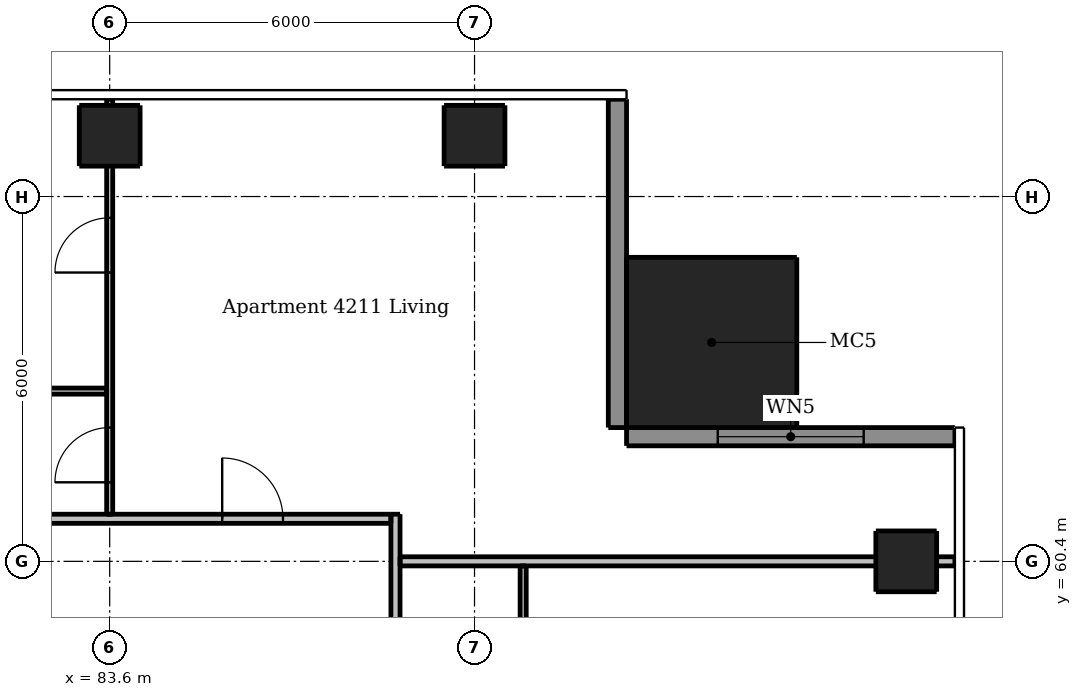
"""IFC4 building model, lengths in metres.
Left out: names, types, materials, properties, quantities, classifications, styles, units other than length and angle.
Written with IfcOpenShell. Run it as: python <this file> out.ifc"""

import sys

from ifc_helpers import new_model, si_unit, direction, frame, frame_2d, origin, origin_2d, place, context, subcontext, project, spatial, rectangle, extrude, element, fill, save


model = new_model("IFC4")
c1 = context("Model", 3, precision=1e-05, world=origin(), true_north=direction((0.0, 1.0)))
c2 = subcontext(c1, "Body", "Model", "MODEL_VIEW")
j1 = project(units=[si_unit("LENGTHUNIT", "METRE"), si_unit("PLANEANGLEUNIT", "RADIAN")], contexts=[c1])
p1 = place(None, origin())
s1 = spatial("IfcSite", under=j1, at=p1, CompositionType="ELEMENT")
p2 = place(p1, origin())
s2 = spatial("IfcBuilding", under=s1, at=p2, CompositionType="ELEMENT")
p3 = place(p2, frame((0.0, 0.0, 158.2)))
s3 = spatial("IfcBuildingStorey", under=s2, at=p3, CompositionType="ELEMENT", Elevation=158.2)
for number, where, z_axis, x_axis in (
    (1, (96.7, 60.4, 0.0), (0.0, 0.0, 1.0), (1.0, 0.0, 0.0)),
    (2, (83.6, 67.4, 0.0), (0.0, 0.0, 1.0), (1.0, 0.0, 0.0)),
    (3, (89.6, 67.4, 0.0), (0.0, 0.0, 1.0), (1.0, 0.0, 0.0)),
):
    element("IfcColumn", number, at=place(p3, frame(where, z_axis=z_axis, x_axis=x_axis)), inside=s3, PredefinedType="COLUMN", context=c2, shape_type="SweptSolid", body=[
        extrude(rectangle(XDim=1.0, YDim=1.0, at=origin_2d()), origin(), (0.0, 0.0, 1.0), 3.05),
    ])
p4 = place(p3, frame((93.5, 64.0, 0.0), z_axis=(0.0, 0.0, 1.0), x_axis=(1.0, 0.0, 0.0)))
e4 = element("IfcColumn", 4, at=p4, inside=s3, PredefinedType="COLUMN", context=c2, shape_type="SweptSolid", body=[
    extrude(rectangle(XDim=2.8, YDim=2.8, at=origin_2d()), origin(), (0.0, 0.0, 1.0), 3.3),
])
p5 = place(p3, frame((97.5, 62.45, 0.0), z_axis=(0.0, 0.0, 1.0), x_axis=(-1.0, 0.0, 0.0)))
e5 = element("IfcWall", 5, at=p5, inside=s3, PredefinedType="SOLIDWALL", context=c2, shape_type="SweptSolid", body=[
    extrude(rectangle(XDim=5.4, YDim=0.3, at=frame_2d((2.7, 0.0))), origin(), (0.0, 0.0, 1.0), 3.05),
])
p6 = place(p5, frame((1.5, 0.0, 0.15)))
e6 = element("IfcOpeningElement", 6, at=p6, cuts=e5, PredefinedType="OPENING", context=c2, shape_type="SweptSolid", body=[
    extrude(rectangle(XDim=2.4, YDim=2.1, at=frame_2d((1.2, 1.05))), frame((0.0, 0.16, 0.0), z_axis=(0.0, -1.0, 0.0), x_axis=(1.0, 0.0, 0.0)), (0.0, 0.0, 1.0), 0.32),
])
p7 = place(p3, frame((91.95, 62.6, 0.0), z_axis=(0.0, 0.0, 1.0), x_axis=(0.0, 1.0, 0.0)))
e7 = element("IfcWall", 7, at=p7, inside=s3, PredefinedType="SOLIDWALL", context=c2, shape_type="SweptSolid", body=[
    extrude(rectangle(XDim=5.4, YDim=0.3, at=frame_2d((2.7, 0.0))), origin(), (0.0, 0.0, 1.0), 3.05),
])
p8 = place(p3, frame((83.6, 61.175, 0.0), z_axis=(0.0, 0.0, 1.0), x_axis=(0.0, 1.0, 0.0)))
e8 = element("IfcWall", 8, at=p8, inside=s3, PredefinedType="PARTITIONING", context=c2, shape_type="SweptSolid", body=[
    extrude(rectangle(XDim=6.825, YDim=0.1, at=frame_2d((3.413, 0.0))), origin(), (0.0, 0.0, 1.0), 2.516),
])
p9 = place(p8, frame((0.525, 0.0, 0.0)))
e9 = element("IfcOpeningElement", 9, at=p9, cuts=e8, PredefinedType="OPENING", context=c2, shape_type="SweptSolid", body=[
    extrude(rectangle(XDim=0.9, YDim=2.1, at=frame_2d((0.45, 1.05))), frame((0.0, 0.06, 0.0), z_axis=(0.0, -1.0, 0.0), x_axis=(1.0, 0.0, 0.0)), (0.0, 0.0, 1.0), 0.12),
])
p10 = place(p8, frame((3.975, 0.0, 0.0)))
e10 = element("IfcOpeningElement", 10, at=p10, cuts=e8, PredefinedType="OPENING", context=c2, shape_type="SweptSolid", body=[
    extrude(rectangle(XDim=0.9, YDim=2.1, at=frame_2d((0.45, 1.05))), frame((0.0, 0.06, 0.0), z_axis=(0.0, -1.0, 0.0), x_axis=(1.0, 0.0, 0.0)), (0.0, 0.0, 1.0), 0.12),
])
p11 = place(p3, frame((90.4, 58.25, 0.0), z_axis=(0.0, 0.0, 1.0), x_axis=(0.0, 1.0, 0.0)))
e11 = element("IfcWall", 11, at=p11, inside=s3, PredefinedType="PARTITIONING", context=c2, shape_type="SweptSolid", body=[
    extrude(rectangle(XDim=2.075, YDim=0.1, at=frame_2d((1.038, 0.0))), origin(), (0.0, 0.0, 1.0), 3.05),
])
p12 = place(p3, frame((83.55, 63.2, 0.0), z_axis=(0.0, 0.0, 1.0), x_axis=(-1.0, 0.0, 0.0)))
e12 = element("IfcWall", 12, at=p12, inside=s3, PredefinedType="PARTITIONING", context=c2, shape_type="SweptSolid", body=[
    extrude(rectangle(XDim=5.875, YDim=0.1, at=frame_2d((2.938, 0.0))), origin(), (0.0, 0.0, 1.0), 3.05),
])
p13 = place(p12, frame((3.75, 0.0, 0.0)))
e13 = element("IfcOpeningElement", 13, at=p13, cuts=e12, PredefinedType="OPENING", context=c2, shape_type="SweptSolid", body=[
    extrude(rectangle(XDim=0.8, YDim=2.1, at=frame_2d((0.4, 1.05))), frame((0.0, 0.06, 0.0), z_axis=(0.0, -1.0, 0.0), x_axis=(1.0, 0.0, 0.0)), (0.0, 0.0, 1.0), 0.12),
])
p14 = place(p3, frame((88.3, 61.175, 0.0), z_axis=(0.0, 0.0, 1.0), x_axis=(0.0, -1.0, 0.0)))
e14 = element("IfcWall", 14, at=p14, inside=s3, PredefinedType="PARTITIONING", context=c2, shape_type="SweptSolid", body=[
    extrude(rectangle(XDim=29.4, YDim=0.15, at=frame_2d((14.7, 0.0))), origin(), (0.0, 0.0, 1.0), 3.05),
])
p15 = place(p14, frame((28.125, 0.0, 0.0)))
e15 = element("IfcOpeningElement", 15, at=p15, cuts=e14, PredefinedType="OPENING", context=c2, shape_type="SweptSolid", body=[
    extrude(rectangle(XDim=1.0, YDim=2.1, at=frame_2d((0.5, 1.05))), frame((0.0, 0.085, 0.0), z_axis=(0.0, -1.0, 0.0), x_axis=(1.0, 0.0, 0.0)), (0.0, 0.0, 1.0), 0.17),
])
p16 = place(p14, frame((18.275, 0.0, 0.0)))
e16 = element("IfcOpeningElement", 16, at=p16, cuts=e14, PredefinedType="OPENING", context=c2, shape_type="SweptSolid", body=[
    extrude(rectangle(XDim=1.0, YDim=2.1, at=frame_2d((0.5, 1.05))), frame((0.0, 0.085, 0.0), z_axis=(0.0, -1.0, 0.0), x_axis=(1.0, 0.0, 0.0)), (0.0, 0.0, 1.0), 0.17),
])
p17 = place(p14, frame((10.475, 0.0, 0.0)))
e17 = element("IfcOpeningElement", 17, at=p17, cuts=e14, PredefinedType="OPENING", context=c2, shape_type="SweptSolid", body=[
    extrude(rectangle(XDim=1.0, YDim=2.1, at=frame_2d((0.5, 1.05))), frame((0.0, 0.085, 0.0), z_axis=(0.0, -1.0, 0.0), x_axis=(1.0, 0.0, 0.0)), (0.0, 0.0, 1.0), 0.17),
])
p18 = place(p14, frame((3.275, 0.0, 0.0)))
e18 = element("IfcOpeningElement", 18, at=p18, cuts=e14, PredefinedType="OPENING", context=c2, shape_type="SweptSolid", body=[
    extrude(rectangle(XDim=1.0, YDim=2.1, at=frame_2d((0.5, 1.05))), frame((0.0, 0.085, 0.0), z_axis=(0.0, -1.0, 0.0), x_axis=(1.0, 0.0, 0.0)), (0.0, 0.0, 1.0), 0.17),
])
p19 = place(p3, frame((58.975, 61.1, 0.0), z_axis=(0.0, 0.0, 1.0), x_axis=(1.0, 0.0, 0.0)))
e19 = element("IfcWall", 19, at=p19, inside=s3, PredefinedType="PARTITIONING", context=c2, shape_type="SweptSolid", body=[
    extrude(rectangle(XDim=29.25, YDim=0.15, at=frame_2d((14.625, 0.0))), origin(), (0.0, 0.0, 1.0), 3.05),
])
p20 = place(p19, frame((3.125, 0.0, 0.0)))
e20 = element("IfcOpeningElement", 20, at=p20, cuts=e19, PredefinedType="OPENING", context=c2, shape_type="SweptSolid", body=[
    extrude(rectangle(XDim=1.0, YDim=2.1, at=frame_2d((0.5, 1.05))), frame((0.0, 0.085, 0.0), z_axis=(0.0, -1.0, 0.0), x_axis=(1.0, 0.0, 0.0)), (0.0, 0.0, 1.0), 0.17),
])
p21 = place(p19, frame((9.125, 0.0, 0.0)))
e21 = element("IfcOpeningElement", 21, at=p21, cuts=e19, PredefinedType="OPENING", context=c2, shape_type="SweptSolid", body=[
    extrude(rectangle(XDim=1.0, YDim=2.1, at=frame_2d((0.5, 1.05))), frame((0.0, 0.085, 0.0), z_axis=(0.0, -1.0, 0.0), x_axis=(1.0, 0.0, 0.0)), (0.0, 0.0, 1.0), 0.17),
])
p22 = place(p19, frame((15.125, 0.0, 0.0)))
e22 = element("IfcOpeningElement", 22, at=p22, cuts=e19, PredefinedType="OPENING", context=c2, shape_type="SweptSolid", body=[
    extrude(rectangle(XDim=1.0, YDim=2.1, at=frame_2d((0.5, 1.05))), frame((0.0, 0.085, 0.0), z_axis=(0.0, -1.0, 0.0), x_axis=(1.0, 0.0, 0.0)), (0.0, 0.0, 1.0), 0.17),
])
p23 = place(p19, frame((26.475, 0.0, 0.0)))
e23 = element("IfcOpeningElement", 23, at=p23, cuts=e19, PredefinedType="OPENING", context=c2, shape_type="SweptSolid", body=[
    extrude(rectangle(XDim=1.0, YDim=2.1, at=frame_2d((0.5, 1.05))), frame((0.0, 0.085, 0.0), z_axis=(0.0, -1.0, 0.0), x_axis=(1.0, 0.0, 0.0)), (0.0, 0.0, 1.0), 0.17),
])
p24 = place(p3, frame((88.375, 60.4, 0.0), z_axis=(0.0, 0.0, 1.0), x_axis=(1.0, 0.0, 0.0)))
e24 = element("IfcWall", 24, at=p24, inside=s3, PredefinedType="PARTITIONING", context=c2, shape_type="SweptSolid", body=[
    extrude(rectangle(XDim=9.125, YDim=0.15, at=frame_2d((4.562, 0.0))), origin(), (0.0, 0.0, 1.0), 2.647),
])
p25 = place(p6, origin())
e25 = element("IfcWindow", 25, at=p25, inside=s3, PartitioningType="DOUBLE_PANEL_VERTICAL", PredefinedType="WINDOW", context=c2, shape_type="SweptSolid", body=[
    extrude(rectangle(XDim=2.4, YDim=2.1, at=frame_2d((1.2, 1.05))), frame((0.0, 0.03, 0.0), z_axis=(0.0, -1.0, 0.0), x_axis=(1.0, 0.0, 0.0)), (0.0, 0.0, 1.0), 0.06),
])
fill(e6, e25)
p26 = place(p23, origin())
e26 = element("IfcDoor", 26, at=p26, inside=s3, OperationType="SINGLE_SWING_LEFT", PredefinedType="DOOR", context=c2, shape_type="SweptSolid", body=[
    extrude(rectangle(XDim=1.0, YDim=2.1, at=frame_2d((0.5, 1.05))), frame((0.0, 0.025, 0.0), z_axis=(0.0, -1.0, 0.0), x_axis=(1.0, 0.0, 0.0)), (0.0, 0.0, 1.0), 0.05),
])
fill(e23, e26)
p27 = place(p9, origin())
e27 = element("IfcDoor", 27, at=p27, inside=s3, OperationType="SINGLE_SWING_LEFT", PredefinedType="DOOR", context=c2, shape_type="SweptSolid", body=[
    extrude(rectangle(XDim=0.9, YDim=2.1, at=frame_2d((0.45, 1.05))), frame((0.0, 0.025, 0.0), z_axis=(0.0, -1.0, 0.0), x_axis=(1.0, 0.0, 0.0)), (0.0, 0.0, 1.0), 0.05),
])
fill(e9, e27)
p28 = place(p10, origin())
e28 = element("IfcDoor", 28, at=p28, inside=s3, OperationType="SINGLE_SWING_LEFT", PredefinedType="DOOR", context=c2, shape_type="SweptSolid", body=[
    extrude(rectangle(XDim=0.9, YDim=2.1, at=frame_2d((0.45, 1.05))), frame((0.0, 0.025, 0.0), z_axis=(0.0, -1.0, 0.0), x_axis=(1.0, 0.0, 0.0)), (0.0, 0.0, 1.0), 0.05),
])
fill(e10, e28)
save(model, sys.argv[1])
